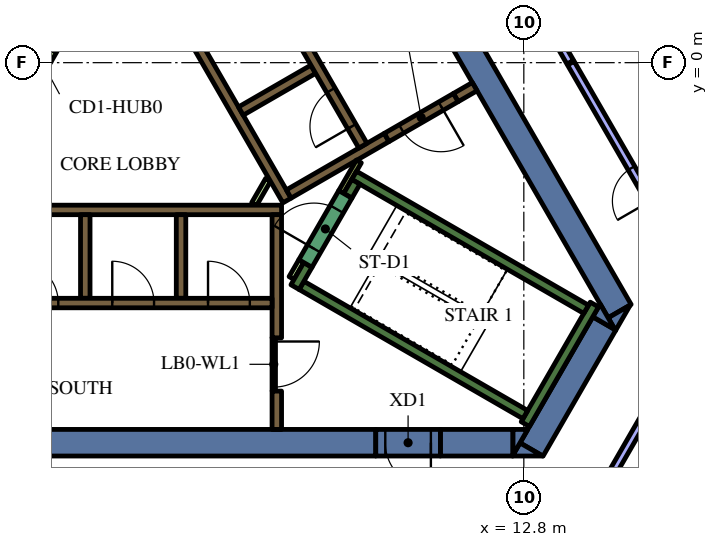
"""IFC4 building model, lengths in metres.
Left out: names, types, materials, properties, quantities, classifications, styles, units other than length and angle.
Written with IfcOpenShell. Run it as: python <this file> out.ifc"""

import sys

from ifc_helpers import new_model, si_unit, direction, frame, frame_2d, origin, place, context, subcontext, project, spatial, polyline, rectangle, outline, extrude, element, fill, save


model = new_model("IFC4")
c1 = context("Model", 3, precision=1e-05, world=origin(), true_north=direction((0.0, 1.0)))
c2 = subcontext(c1, "Body", "Model", "MODEL_VIEW")
j1 = project(units=[si_unit("LENGTHUNIT", "METRE"), si_unit("PLANEANGLEUNIT", "RADIAN")], contexts=[c1])
p1 = place(None, origin())
s1 = spatial("IfcSite", under=j1, at=p1, CompositionType="ELEMENT")
p2 = place(p1, origin())
s2 = spatial("IfcBuilding", under=s1, at=p2, CompositionType="ELEMENT")
p3 = place(p2, frame((0.0, 0.0, 239.4)))
s3 = spatial("IfcBuildingStorey", under=s2, at=p3, CompositionType="ELEMENT", Elevation=239.4)
p4 = place(p3, frame((9.085, 4.264, 0.0), z_axis=(0.0, 0.0, 1.0), x_axis=(0.499998082512, -0.866026510844, 0.0)))
e1 = element("IfcWall", 1, at=p4, inside=s3, PredefinedType="SOLIDWALL", context=c2, shape_type="SweptSolid", body=[
    extrude(rectangle(XDim=12.472, YDim=0.7, at=frame_2d((6.236, 0.0))), origin(), (0.0, 0.0, 1.0), 4.2),
])
p5 = place(p3, origin())
e2 = element("IfcWall", 2, at=p5, inside=s3, PredefinedType="SOLIDWALL", context=c2, shape_type="SweptSolid", body=[
    extrude(outline(polyline([(15.213, -7.05), (15.019, -6.714), (15.601, -6.378), (15.213, -7.05)])), origin(), (0.0, 0.0, 1.0), 4.2),
])
p6 = place(p3, frame((13.003, -10.179, 0.0), z_axis=(0.0, 0.0, 1.0), x_axis=(0.499972675833, 0.866041178825, 0.0)))
e3 = element("IfcWall", 3, at=p6, inside=s3, PredefinedType="SOLIDWALL", context=c2, shape_type="SweptSolid", body=[
    extrude(rectangle(XDim=3.829, YDim=0.7, at=frame_2d((1.915, 0.0))), origin(), (0.0, 0.0, 1.0), 4.2),
])
e4 = element("IfcWall", 4, at=p5, inside=s3, PredefinedType="SOLIDWALL", context=c2, shape_type="SweptSolid", body=[
    extrude(outline(polyline([(12.5, -10.35), (12.698, -10.005), (13.296, -10.35), (12.5, -10.35)])), origin(), (0.0, 0.0, 1.0), 4.2),
])
e5 = element("IfcWall", 5, at=p5, inside=s3, PredefinedType="SOLIDWALL", context=c2, shape_type="SweptSolid", body=[
    extrude(outline(polyline([(14.809, -6.35), (15.197, -7.022), (14.615, -6.686), (14.809, -6.35)])), origin(), (0.0, 0.0, 1.0), 4.2),
])
p7 = place(p3, frame((10.604, -10.0, 0.0), z_axis=(0.0, 0.0, 1.0), x_axis=(1.0, 0.0, 0.0)))
e6 = element("IfcWall", 6, at=p7, inside=s3, PredefinedType="SOLIDWALL", context=c2, shape_type="SweptSolid", body=[
    extrude(rectangle(XDim=1.909, YDim=0.7, at=frame_2d((0.955, 0.0))), origin(), (0.0, 0.0, 1.0), 4.2),
])
e7 = element("IfcWall", 7, at=p5, inside=s3, PredefinedType="SOLIDWALL", context=c2, shape_type="SweptSolid", body=[
    extrude(outline(polyline([(12.904, -9.65), (12.516, -10.322), (12.516, -9.65), (12.904, -9.65)])), origin(), (0.0, 0.0, 1.0), 4.2),
])
p8 = place(p3, frame((8.904, -10.0, 0.0), z_axis=(0.0, 0.0, 1.0), x_axis=(-1.0, 0.0, 0.0)))
e8 = element("IfcWall", 8, at=p8, inside=s3, PredefinedType="SOLIDWALL", context=c2, shape_type="SweptSolid", body=[
    extrude(rectangle(XDim=22.226, YDim=0.7, at=frame_2d((11.113, 0.0))), origin(), (0.0, 0.0, 1.0), 4.2),
])
p9 = place(p3, frame((12.84, -9.511, 0.0), z_axis=(0.0, 0.0, 1.0), x_axis=(0.500048121057, 0.865997619297, 0.0)))
e9 = element("IfcWall", 9, at=p9, inside=s3, PredefinedType="SOLIDWALL", context=c2, shape_type="SweptSolid", body=[
    extrude(rectangle(XDim=3.634, YDim=0.25, at=frame_2d((1.817, 0.0))), origin(), (0.0, 0.0, 1.0), 4.2),
])
p10 = place(p3, frame((12.84, -9.261, 0.0), z_axis=(0.0, 0.0, 1.0), x_axis=(-0.866013990052, 0.500019768644, 0.0)))
e10 = element("IfcWall", 10, at=p10, inside=s3, PredefinedType="SOLIDWALL", context=c2, shape_type="SweptSolid", body=[
    extrude(rectangle(XDim=6.8, YDim=0.25, at=frame_2d((3.4, 0.0))), origin(), (0.0, 0.0, 1.0), 4.2),
])
p11 = place(p3, frame((6.78, -5.906, 0.0), z_axis=(0.0, 0.0, 1.0), x_axis=(0.500223362819, 0.865896406789, 0.0)))
e11 = element("IfcWall", 11, at=p11, inside=s3, PredefinedType="SOLIDWALL", context=c2, shape_type="SweptSolid", body=[
    extrude(rectangle(XDim=0.675, YDim=0.25, at=frame_2d((0.337, 0.0))), origin(), (0.0, 0.0, 1.0), 4.2),
])
p12 = place(p3, frame((8.334, -2.964, 0.0), z_axis=(0.0, 0.0, 1.0), x_axis=(0.866016039709, -0.500016218704, 0.0)))
e12 = element("IfcWall", 12, at=p12, inside=s3, PredefinedType="SOLIDWALL", context=c2, shape_type="SweptSolid", body=[
    extrude(rectangle(XDim=7.05, YDim=0.25, at=frame_2d((3.525, 0.0))), origin(), (0.0, 0.0, 1.0), 4.2),
])
p13 = place(p3, frame((8.168, -3.503, 0.0), z_axis=(0.0, 0.0, 1.0), x_axis=(0.49972245349, 0.866185586049, 0.0)))
e13 = element("IfcWall", 13, at=p13, inside=s3, PredefinedType="SOLIDWALL", context=c2, shape_type="SweptSolid", body=[
    extrude(rectangle(XDim=0.425, YDim=0.25, at=frame_2d((0.212, 0.0))), origin(), (0.0, 0.0, 1.0), 4.2),
])
p14 = place(p3, frame((-5.545, -3.875, 0.0), z_axis=(0.0, 0.0, 1.0), x_axis=(1.0, 0.0, 0.0)))
e14 = element("IfcWall", 14, at=p14, inside=s3, PredefinedType="SOLIDWALL", context=c2, shape_type="SweptSolid", body=[
    extrude(rectangle(XDim=11.97, YDim=0.25, at=frame_2d((5.985, 0.0))), origin(), (0.0, 0.0, 1.0), 4.2),
])
p15 = place(p3, frame((6.3, -7.24, 0.0), z_axis=(0.0, 0.0, 1.0), x_axis=(0.0, 1.0, 0.0)))
e15 = element("IfcWall", 15, at=p15, inside=s3, PredefinedType="SOLIDWALL", context=c2, shape_type="SweptSolid", body=[
    extrude(rectangle(XDim=3.24, YDim=0.25, at=frame_2d((1.62, 0.0))), origin(), (0.0, 0.0, 1.0), 4.2),
])
p16 = place(p3, frame((6.3, -9.65, 0.0), z_axis=(0.0, 0.0, 1.0), x_axis=(0.0, 1.0, 0.0)))
e16 = element("IfcWall", 16, at=p16, inside=s3, PredefinedType="SOLIDWALL", context=c2, shape_type="SweptSolid", body=[
    extrude(rectangle(XDim=1.008, YDim=0.25, at=frame_2d((0.504, 0.0))), origin(), (0.0, 0.0, 1.0), 4.2),
])
for number, where, z_axis, x_axis in (
    (17, (3.78, -4.0, 0.0), (0.0, 0.0, 1.0), (0.0, -1.0, 0.0)),
    (18, (1.26, -4.0, 0.0), (0.0, 0.0, 1.0), (0.0, -1.0, 0.0)),
):
    element("IfcWall", number, at=place(p3, frame(where, z_axis=z_axis, x_axis=x_axis)), inside=s3, PredefinedType="SOLIDWALL", context=c2, shape_type="SweptSolid", body=[
        extrude(rectangle(XDim=2.2, YDim=0.25, at=frame_2d((1.1, 0.0))), origin(), (0.0, 0.0, 1.0), 4.2),
    ])
p17 = place(p3, frame((11.507, -0.631, 0.0), z_axis=(0.0, 0.0, 1.0), x_axis=(-0.866093731455, -0.499881634324, 0.0)))
e19 = element("IfcWall", 19, at=p17, inside=s3, PredefinedType="SOLIDWALL", context=c2, shape_type="SweptSolid", body=[
    extrude(rectangle(XDim=0.575, YDim=0.25, at=frame_2d((0.288, 0.0))), origin(), (0.0, 0.0, 1.0), 4.2),
])
p18 = place(p3, frame((6.568, -3.627, 0.0), z_axis=(0.0, 0.0, 1.0), x_axis=(-0.499999455981, 0.866025717874, 0.0)))
e20 = element("IfcWall", 20, at=p18, inside=s3, PredefinedType="SOLIDWALL", context=c2, shape_type="SweptSolid", body=[
    extrude(rectangle(XDim=11.978, YDim=0.25, at=frame_2d((5.989, 0.0))), origin(), (0.0, 0.0, 1.0), 4.2),
])
p19 = place(p3, frame((5.354, -1.274, 0.0), z_axis=(0.0, 0.0, 1.0), x_axis=(0.866008176907, 0.50002983664, 0.0)))
e21 = element("IfcWall", 21, at=p19, inside=s3, PredefinedType="SOLIDWALL", context=c2, shape_type="SweptSolid", body=[
    extrude(rectangle(XDim=2.2, YDim=0.25, at=frame_2d((1.1, 0.0))), origin(), (0.0, 0.0, 1.0), 4.2),
])
p20 = place(p3, frame((6.614, -3.456, 0.0), z_axis=(0.0, 0.0, 1.0), x_axis=(0.866032512851, 0.499987686533, 0.0)))
e22 = element("IfcWall", 22, at=p20, inside=s3, PredefinedType="SOLIDWALL", context=c2, shape_type="SweptSolid", body=[
    extrude(rectangle(XDim=2.975, YDim=0.25, at=frame_2d((1.487, 0.0))), origin(), (0.0, 0.0, 1.0), 4.2),
])
p21 = place(p3, frame((6.945, -5.222, 0.0), z_axis=(0.0, 0.0, 1.0), x_axis=(-0.499818422106, -0.866130212453, 0.0)))
e23 = element("IfcWall", 23, at=p21, inside=s3, PredefinedType="PARTITIONING", context=c2, shape_type="SweptSolid", body=[
    extrude(rectangle(XDim=0.514, YDim=0.15, at=frame_2d((0.257, 0.0))), origin(), (0.0, 0.0, 1.0), 3.45),
])
p22 = place(p3, frame((8.459, -2.599, 0.0), z_axis=(0.0, 0.0, 1.0), x_axis=(-0.500041054325, -0.866001699761, 0.0)))
e24 = element("IfcWall", 24, at=p22, inside=s3, PredefinedType="PARTITIONING", context=c2, shape_type="SweptSolid", body=[
    extrude(rectangle(XDim=0.929, YDim=0.15, at=frame_2d((0.464, 0.0))), origin(), (0.0, 0.0, 1.0), 4.2),
])
p23 = place(p3, frame((5.705, -3.718, 0.0), z_axis=(0.0, 0.0, 1.0), x_axis=(0.499962090823, 0.866047289552, 0.0)))
e25 = element("IfcWall", 25, at=p23, inside=s3, PredefinedType="PARTITIONING", context=c2, shape_type="SweptSolid", body=[
    extrude(rectangle(XDim=0.735, YDim=0.15, at=frame_2d((0.367, 0.0))), origin(), (0.0, 0.0, 1.0), 3.45),
])
p24 = place(p3, frame((-6.175, -6.325, 0.0), z_axis=(0.0, 0.0, 1.0), x_axis=(1.0, 0.0, 0.0)))
e26 = element("IfcWall", 26, at=p24, inside=s3, PredefinedType="SOLIDWALL", context=c2, shape_type="SweptSolid", body=[
    extrude(rectangle(XDim=12.35, YDim=0.25, at=frame_2d((6.175, 0.0))), origin(), (0.0, 0.0, 1.0), 4.2),
])
p25 = place(p24, frame((0.585, 0.0, 0.0)))
e27 = element("IfcOpeningElement", 27, at=p25, cuts=e26, PredefinedType="OPENING", context=c2, shape_type="SweptSolid", body=[
    extrude(rectangle(XDim=1.1, YDim=2.1, at=frame_2d((0.55, 1.05))), frame((0.0, 0.135, 0.0), z_axis=(0.0, -1.0, 0.0), x_axis=(1.0, 0.0, 0.0)), (0.0, 0.0, 1.0), 0.27),
])
p26 = place(p24, frame((3.105, 0.0, 0.0)))
e28 = element("IfcOpeningElement", 28, at=p26, cuts=e26, PredefinedType="OPENING", context=c2, shape_type="SweptSolid", body=[
    extrude(rectangle(XDim=1.1, YDim=2.1, at=frame_2d((0.55, 1.05))), frame((0.0, 0.135, 0.0), z_axis=(0.0, -1.0, 0.0), x_axis=(1.0, 0.0, 0.0)), (0.0, 0.0, 1.0), 0.27),
])
p27 = place(p24, frame((5.625, 0.0, 0.0)))
e29 = element("IfcOpeningElement", 29, at=p27, cuts=e26, PredefinedType="OPENING", context=c2, shape_type="SweptSolid", body=[
    extrude(rectangle(XDim=1.1, YDim=2.1, at=frame_2d((0.55, 1.05))), frame((0.0, 0.135, 0.0), z_axis=(0.0, -1.0, 0.0), x_axis=(1.0, 0.0, 0.0)), (0.0, 0.0, 1.0), 0.27),
])
p28 = place(p24, frame((8.145, 0.0, 0.0)))
e30 = element("IfcOpeningElement", 30, at=p28, cuts=e26, PredefinedType="OPENING", context=c2, shape_type="SweptSolid", body=[
    extrude(rectangle(XDim=1.1, YDim=2.1, at=frame_2d((0.55, 1.05))), frame((0.0, 0.135, 0.0), z_axis=(0.0, -1.0, 0.0), x_axis=(1.0, 0.0, 0.0)), (0.0, 0.0, 1.0), 0.27),
])
p29 = place(p24, frame((10.665, 0.0, 0.0)))
e31 = element("IfcOpeningElement", 31, at=p29, cuts=e26, PredefinedType="OPENING", context=c2, shape_type="SweptSolid", body=[
    extrude(rectangle(XDim=1.1, YDim=2.1, at=frame_2d((0.55, 1.05))), frame((0.0, 0.135, 0.0), z_axis=(0.0, -1.0, 0.0), x_axis=(1.0, 0.0, 0.0)), (0.0, 0.0, 1.0), 0.27),
])
p30 = place(p3, frame((8.565, -2.185, 0.0), z_axis=(0.0, 0.0, 1.0), x_axis=(-0.499997954832, 0.866026584559, 0.0)))
e32 = element("IfcWall", 32, at=p30, inside=s3, PredefinedType="SOLIDWALL", context=c2, shape_type="SweptSolid", body=[
    extrude(rectangle(XDim=12.35, YDim=0.25, at=frame_2d((6.175, 0.0))), origin(), (0.0, 0.0, 1.0), 4.2),
])
p31 = place(p30, frame((0.585, 0.0, 0.0)))
e33 = element("IfcOpeningElement", 33, at=p31, cuts=e32, PredefinedType="OPENING", context=c2, shape_type="SweptSolid", body=[
    extrude(rectangle(XDim=1.1, YDim=2.1, at=frame_2d((0.55, 1.05))), frame((0.0, 0.135, 0.0), z_axis=(0.0, -1.0, 0.0), x_axis=(1.0, 0.0, 0.0)), (0.0, 0.0, 1.0), 0.27),
])
p32 = place(p3, frame((7.053, -5.284, 0.0), z_axis=(0.0, 0.0, 1.0), x_axis=(0.500078061341, 0.865980330357, 0.0)))
e34 = element("IfcWall", 34, at=p32, inside=s3, PredefinedType="SOLIDWALL", context=c2, shape_type="SweptSolid", body=[
    extrude(rectangle(XDim=2.1, YDim=0.4, at=frame_2d((1.05, 0.0))), origin(), (0.0, 0.0, 1.0), 4.2),
])
p33 = place(p32, frame((0.45, 0.0, 0.0)))
e35 = element("IfcOpeningElement", 35, at=p33, cuts=e34, PredefinedType="OPENING", context=c2, shape_type="SweptSolid", body=[
    extrude(rectangle(XDim=1.2, YDim=2.1, at=frame_2d((0.6, 1.05))), frame((0.0, 0.21, 0.0), z_axis=(0.0, -1.0, 0.0), x_axis=(1.0, 0.0, 0.0)), (0.0, 0.0, 1.0), 0.42),
])
p34 = place(p3, frame((-0.33, -1.022, 0.0), z_axis=(0.0, 0.0, 1.0), x_axis=(0.500027713859, 0.866009402589, 0.0)))
e36 = element("IfcWall", 36, at=p34, inside=s3, PredefinedType="PARTITIONING", context=c2, shape_type="SweptSolid", body=[
    extrude(rectangle(XDim=2.1, YDim=0.15, at=frame_2d((1.05, 0.0))), origin(), (0.0, 0.0, 1.0), 3.45),
])
p35 = place(p34, frame((0.6, 0.0, 0.0)))
e37 = element("IfcOpeningElement", 37, at=p35, cuts=e36, PredefinedType="OPENING", context=c2, shape_type="SweptSolid", body=[
    extrude(rectangle(XDim=0.9, YDim=2.1, at=frame_2d((0.45, 1.05))), frame((0.0, 0.085, 0.0), z_axis=(0.0, -1.0, 0.0), x_axis=(1.0, 0.0, 0.0)), (0.0, 0.0, 1.0), 0.17),
])
p36 = place(p3, frame((6.22, -7.237, 0.0), z_axis=(0.0, 0.0, 1.0), x_axis=(0.0, -1.0, 0.0)))
e38 = element("IfcWall", 38, at=p36, inside=s3, PredefinedType="PARTITIONING", context=c2, shape_type="SweptSolid", body=[
    extrude(rectangle(XDim=1.4, YDim=0.09, at=frame_2d((0.7, 0.0))), origin(), (0.0, 0.0, 1.0), 3.45),
])
p37 = place(p36, frame((0.1, 0.0, 0.0)))
e39 = element("IfcOpeningElement", 39, at=p37, cuts=e38, PredefinedType="OPENING", context=c2, shape_type="SweptSolid", body=[
    extrude(rectangle(XDim=1.2, YDim=2.1, at=frame_2d((0.6, 1.05))), frame((0.0, 0.055, 0.0), z_axis=(0.0, -1.0, 0.0), x_axis=(1.0, 0.0, 0.0)), (0.0, 0.0, 1.0), 0.11),
])
p38 = place(p3, frame((11.009, -0.919, 0.0), z_axis=(0.0, 0.0, 1.0), x_axis=(-0.866059744384, -0.49994051562, 0.0)))
e40 = element("IfcWall", 40, at=p38, inside=s3, PredefinedType="SOLIDWALL", context=c2, shape_type="SweptSolid", body=[
    extrude(rectangle(XDim=2.1, YDim=0.25, at=frame_2d((1.05, 0.0))), origin(), (0.0, 0.0, 1.0), 4.2),
])
p39 = place(p38, frame((0.45, 0.0, 0.0)))
e41 = element("IfcOpeningElement", 41, at=p39, cuts=e40, PredefinedType="OPENING", context=c2, shape_type="SweptSolid", body=[
    extrude(rectangle(XDim=1.2, YDim=2.1, at=frame_2d((0.6, 1.05))), frame((0.0, 0.135, 0.0), z_axis=(0.0, -1.0, 0.0), x_axis=(1.0, 0.0, 0.0)), (0.0, 0.0, 1.0), 0.27),
])
p40 = place(p3, frame((10.604, -10.0, 0.0), z_axis=(0.0, 0.0, 1.0), x_axis=(-1.0, 0.0, 0.0)))
e42 = element("IfcWall", 42, at=p40, inside=s3, PredefinedType="SOLIDWALL", context=c2, shape_type="SweptSolid", body=[
    extrude(rectangle(XDim=1.7, YDim=0.7, at=frame_2d((0.85, 0.0))), origin(), (0.0, 0.0, 1.0), 4.2),
])
p41 = place(p40, frame((0.25, 0.0, 0.0)))
e43 = element("IfcOpeningElement", 43, at=p41, cuts=e42, PredefinedType="OPENING", context=c2, shape_type="SweptSolid", body=[
    extrude(rectangle(XDim=1.2, YDim=2.1, at=frame_2d((0.6, 1.05))), frame((0.0, 0.36, 0.0), z_axis=(0.0, -1.0, 0.0), x_axis=(1.0, 0.0, 0.0)), (0.0, 0.0, 1.0), 0.72),
])
p42 = place(p3, frame((14.498, -11.888, 0.0), z_axis=(0.0, 0.0, 1.0), x_axis=(0.500006981563, 0.86602137294, 0.0)))
e44 = element("IfcWall", 44, at=p42, inside=s3, PredefinedType="PARTITIONING", context=c2, shape_type="SweptSolid", body=[
    extrude(rectangle(XDim=2.946, YDim=0.2, at=frame_2d((1.473, 0.0))), origin(), (0.0, 0.0, 1.0), 3.45),
])
p43 = place(p3, frame((14.022, 0.013, 0.0), z_axis=(0.0, 0.0, 1.0), x_axis=(-0.500159754115, 0.865933150054, 0.0)))
e45 = element("IfcWall", 45, at=p43, inside=s3, PredefinedType="PARTITIONING", context=c2, shape_type="SweptSolid", body=[
    extrude(rectangle(XDim=0.483, YDim=0.2, at=frame_2d((0.242, 0.0))), origin(), (0.0, 0.0, 1.0), 3.45),
])
p44 = place(p3, frame((17.681, -6.324, 0.0), z_axis=(0.0, 0.0, 1.0), x_axis=(-0.50002695829, 0.866009838849, 0.0)))
e46 = element("IfcWall", 46, at=p44, inside=s3, PredefinedType="PARTITIONING", context=c2, shape_type="SweptSolid", body=[
    extrude(rectangle(XDim=7.287, YDim=0.2, at=frame_2d((3.644, 0.0))), origin(), (0.0, 0.0, 1.0), 3.45),
])
p45 = place(p44, frame((3.1, 0.0, 0.0)))
e47 = element("IfcOpeningElement", 47, at=p45, cuts=e46, PredefinedType="OPENING", context=c2, shape_type="SweptSolid", body=[
    extrude(rectangle(XDim=1.0, YDim=2.1, at=frame_2d((0.5, 1.05))), frame((0.0, 0.11, 0.0), z_axis=(0.0, -1.0, 0.0), x_axis=(1.0, 0.0, 0.0)), (0.0, 0.0, 1.0), 0.22),
])
p46 = place(p27, origin())
e48 = element("IfcDoor", 48, at=p46, inside=s3, OperationType="DOUBLE_DOOR_SLIDING", PredefinedType="DOOR", context=c2, shape_type="SweptSolid", body=[
    extrude(rectangle(XDim=1.1, YDim=2.1, at=frame_2d((0.55, 1.05))), frame((0.0, 0.025, 0.0), z_axis=(0.0, -1.0, 0.0), x_axis=(1.0, 0.0, 0.0)), (0.0, 0.0, 1.0), 0.05),
])
fill(e29, e48)
p47 = place(p28, origin())
e49 = element("IfcDoor", 49, at=p47, inside=s3, OperationType="DOUBLE_DOOR_SLIDING", PredefinedType="DOOR", context=c2, shape_type="SweptSolid", body=[
    extrude(rectangle(XDim=1.1, YDim=2.1, at=frame_2d((0.55, 1.05))), frame((0.0, 0.025, 0.0), z_axis=(0.0, -1.0, 0.0), x_axis=(1.0, 0.0, 0.0)), (0.0, 0.0, 1.0), 0.05),
])
fill(e30, e49)
p48 = place(p29, origin())
e50 = element("IfcDoor", 50, at=p48, inside=s3, OperationType="DOUBLE_DOOR_SLIDING", PredefinedType="DOOR", context=c2, shape_type="SweptSolid", body=[
    extrude(rectangle(XDim=1.1, YDim=2.1, at=frame_2d((0.55, 1.05))), frame((0.0, 0.025, 0.0), z_axis=(0.0, -1.0, 0.0), x_axis=(1.0, 0.0, 0.0)), (0.0, 0.0, 1.0), 0.05),
])
fill(e31, e50)
p49 = place(p31, origin())
e51 = element("IfcDoor", 51, at=p49, inside=s3, OperationType="DOUBLE_DOOR_SLIDING", PredefinedType="DOOR", context=c2, shape_type="SweptSolid", body=[
    extrude(rectangle(XDim=1.1, YDim=2.1, at=frame_2d((0.55, 1.05))), frame((0.0, 0.025, 0.0), z_axis=(0.0, -1.0, 0.0), x_axis=(1.0, 0.0, 0.0)), (0.0, 0.0, 1.0), 0.05),
])
fill(e33, e51)
p50 = place(p33, origin())
e52 = element("IfcDoor", 52, at=p50, inside=s3, OperationType="SINGLE_SWING_LEFT", PredefinedType="DOOR", context=c2, shape_type="SweptSolid", body=[
    extrude(rectangle(XDim=1.2, YDim=2.1, at=frame_2d((0.6, 1.05))), frame((0.0, 0.025, 0.0), z_axis=(0.0, -1.0, 0.0), x_axis=(1.0, 0.0, 0.0)), (0.0, 0.0, 1.0), 0.05),
])
fill(e35, e52)
p51 = place(p35, origin())
e53 = element("IfcDoor", 53, at=p51, inside=s3, OperationType="SINGLE_SWING_LEFT", PredefinedType="DOOR", context=c2, shape_type="SweptSolid", body=[
    extrude(rectangle(XDim=0.9, YDim=2.1, at=frame_2d((0.45, 1.05))), frame((0.0, 0.025, 0.0), z_axis=(0.0, -1.0, 0.0), x_axis=(1.0, 0.0, 0.0)), (0.0, 0.0, 1.0), 0.05),
])
fill(e37, e53)
p52 = place(p37, origin())
e54 = element("IfcDoor", 54, at=p52, inside=s3, OperationType="SINGLE_SWING_LEFT", PredefinedType="DOOR", context=c2, shape_type="SweptSolid", body=[
    extrude(rectangle(XDim=1.2, YDim=2.1, at=frame_2d((0.6, 1.05))), frame((0.0, 0.025, 0.0), z_axis=(0.0, -1.0, 0.0), x_axis=(1.0, 0.0, 0.0)), (0.0, 0.0, 1.0), 0.05),
])
fill(e39, e54)
p53 = place(p39, origin())
e55 = element("IfcDoor", 55, at=p53, inside=s3, OperationType="SINGLE_SWING_LEFT", PredefinedType="DOOR", context=c2, shape_type="SweptSolid", body=[
    extrude(rectangle(XDim=1.2, YDim=2.1, at=frame_2d((0.6, 1.05))), frame((0.0, 0.025, 0.0), z_axis=(0.0, -1.0, 0.0), x_axis=(1.0, 0.0, 0.0)), (0.0, 0.0, 1.0), 0.05),
])
fill(e41, e55)
p54 = place(p41, origin())
e56 = element("IfcDoor", 56, at=p54, inside=s3, OperationType="SINGLE_SWING_LEFT", PredefinedType="DOOR", context=c2, shape_type="SweptSolid", body=[
    extrude(rectangle(XDim=1.2, YDim=2.1, at=frame_2d((0.6, 1.05))), frame((0.0, 0.025, 0.0), z_axis=(0.0, -1.0, 0.0), x_axis=(1.0, 0.0, 0.0)), (0.0, 0.0, 1.0), 0.05),
])
fill(e43, e56)
p55 = place(p45, origin())
e57 = element("IfcDoor", 57, at=p55, inside=s3, OperationType="SINGLE_SWING_LEFT", PredefinedType="DOOR", context=c2, shape_type="SweptSolid", body=[
    extrude(rectangle(XDim=1.0, YDim=2.1, at=frame_2d((0.5, 1.05))), frame((0.0, 0.025, 0.0), z_axis=(0.0, -1.0, 0.0), x_axis=(1.0, 0.0, 0.0)), (0.0, 0.0, 1.0), 0.05),
])
fill(e47, e57)
save(model, sys.argv[1])
